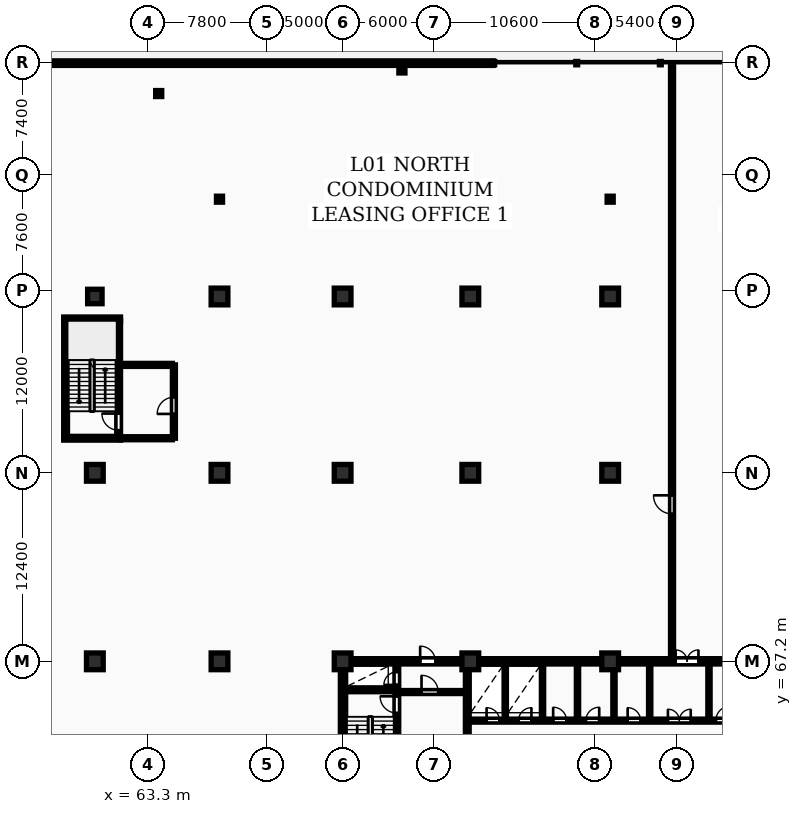
"""IFC4 building model, lengths in metres.
Left out: names, types, materials, properties, quantities, classifications, styles, units other than length and angle.
Written with IfcOpenShell. Run it as: python <this file> out.ifc"""

import sys

from ifc_helpers import new_model, si_unit, direction, frame, frame_2d, origin, origin_2d, place, context, subcontext, project, spatial, rectangle, circle, i_section, extrude, element, fill, save


model = new_model("IFC4")
c1 = context("Model", 3, precision=1e-05, world=origin(), true_north=direction((0.0, 1.0)))
c2 = subcontext(c1, "Body", "Model", "MODEL_VIEW")
j1 = project(units=[si_unit("LENGTHUNIT", "METRE"), si_unit("PLANEANGLEUNIT", "RADIAN")], contexts=[c1])
p1 = place(None, origin())
s1 = spatial("IfcSite", under=j1, at=p1, CompositionType="ELEMENT")
p2 = place(p1, origin())
s2 = spatial("IfcBuilding", under=s1, at=p2, CompositionType="ELEMENT")
p3 = place(p2, frame((0.0, 0.0, 5.4)))
s3 = spatial("IfcBuildingStorey", under=s2, at=p3, CompositionType="ELEMENT", Elevation=5.4)
for number, where, z_axis, x_axis in (
    (1, (59.8, 67.2, 0.0), (0.0, 0.0, 1.0), (1.0, 0.0, 0.0)),
    (2, (59.8, 79.6, 0.0), (0.0, 0.0, 1.0), (1.0, 0.0, 0.0)),
):
    element("IfcColumn", number, at=place(p3, frame(where, z_axis=z_axis, x_axis=x_axis)), inside=s3, PredefinedType="COLUMN", context=c2, shape_type="SweptSolid", body=[
        extrude(rectangle(XDim=1.1, YDim=1.1, at=origin_2d()), origin(), (0.0, 0.0, 1.0), 4.6),
    ])
p4 = place(p3, frame((59.8, 91.2, 0.0), z_axis=(0.0, 0.0, 1.0), x_axis=(1.0, 0.0, 0.0)))
e3 = element("IfcColumn", 3, at=p4, inside=s3, PredefinedType="COLUMN", context=c2, shape_type="SweptSolid", body=[
    extrude(circle(Radius=0.475, at=origin_2d()), origin(), (0.0, 0.0, 1.0), 4.6),
])
for number, where, z_axis, x_axis in (
    (4, (68.0, 67.2, 0.0), (0.0, 0.0, 1.0), (1.0, 0.0, 0.0)),
    (5, (68.0, 79.6, 0.0), (0.0, 0.0, 1.0), (1.0, 0.0, 0.0)),
    (6, (68.0, 91.2, 0.0), (0.0, 0.0, 1.0), (1.0, 0.0, 0.0)),
    (7, (76.1, 67.2, 0.0), (0.0, 0.0, 1.0), (1.0, 0.0, 0.0)),
    (8, (76.1, 79.6, 0.0), (0.0, 0.0, 1.0), (1.0, 0.0, 0.0)),
    (9, (76.1, 91.2, 0.0), (0.0, 0.0, 1.0), (1.0, 0.0, 0.0)),
    (10, (84.5, 67.2, 0.0), (0.0, 0.0, 1.0), (1.0, 0.0, 0.0)),
    (11, (84.5, 79.6, 0.0), (0.0, 0.0, 1.0), (1.0, 0.0, 0.0)),
    (12, (84.5, 91.2, 0.0), (0.0, 0.0, 1.0), (1.0, 0.0, 0.0)),
    (13, (93.7, 67.2, 0.0), (0.0, 0.0, 1.0), (1.0, 0.0, 0.0)),
    (14, (93.7, 79.6, 0.0), (0.0, 0.0, 1.0), (1.0, 0.0, 0.0)),
    (15, (93.7, 91.2, 0.0), (0.0, 0.0, 1.0), (1.0, 0.0, 0.0)),
):
    element("IfcColumn", number, at=place(p3, frame(where, z_axis=z_axis, x_axis=x_axis)), inside=s3, PredefinedType="COLUMN", context=c2, shape_type="SweptSolid", body=[
        extrude(rectangle(XDim=1.1, YDim=1.1, at=origin_2d()), origin(), (0.0, 0.0, 1.0), 4.6),
    ])
for number, where, z_axis, x_axis in (
    (16, (68.0, 97.6, 0.0), (0.0, 0.0, 1.0), (1.0, 0.0, 0.0)),
    (17, (93.7, 97.6, 0.0), (0.0, 0.0, 1.0), (1.0, 0.0, 0.0)),
):
    element("IfcColumn", number, at=place(p3, frame(where, z_axis=z_axis, x_axis=x_axis)), inside=s3, PredefinedType="COLUMN", context=c2, shape_type="SweptSolid", body=[
        extrude(i_section(OverallWidth=0.399, OverallDepth=0.394, WebThickness=0.023, FlangeThickness=0.037, FilletRadius=0.015, at=origin_2d()), origin(), (0.0, 0.0, 1.0), 4.6),
    ])
for number, where, z_axis, x_axis in (
    (18, (80.0, 106.1, 0.0), (0.0, 0.0, 1.0), (1.0, 0.0, 0.0)),
    (19, (64.0, 104.55, 0.0), (0.0, 0.0, 1.0), (1.0, 0.0, 0.0)),
):
    element("IfcColumn", number, at=place(p3, frame(where, z_axis=z_axis, x_axis=x_axis)), inside=s3, PredefinedType="COLUMN", context=c2, shape_type="SweptSolid", body=[
        extrude(i_section(OverallWidth=0.399, OverallDepth=0.394, WebThickness=0.023, FlangeThickness=0.037, FilletRadius=0.015, at=origin_2d()), origin(), (0.0, 0.0, 1.0), 4.36),
    ])
p5 = place(p3, frame((86.0, 106.55, 0.0), z_axis=(0.0, 0.0, 1.0), x_axis=(-1.0, 0.0, 0.0)))
e20 = element("IfcWall", 20, at=p5, inside=s3, PredefinedType="STANDARD", context=c2, shape_type="SweptSolid", body=[
    extrude(rectangle(XDim=39.5, YDim=0.3, at=frame_2d((19.75, 0.0))), origin(), (0.0, 0.0, 1.0), 4.3),
])
p6 = place(p3, frame((76.125, 55.375, 0.0), z_axis=(0.0, 0.0, 1.0), x_axis=(0.0, 1.0, 0.0)))
e21 = element("IfcWall", 21, at=p6, inside=s3, PredefinedType="SHEAR", context=c2, shape_type="SweptSolid", body=[
    extrude(rectangle(XDim=11.65, YDim=0.35, at=frame_2d((5.825, 0.0))), origin(), (0.0, 0.0, 1.0), 4.6),
])
p7 = place(p3, frame((75.95, 67.2, 0.0), z_axis=(0.0, 0.0, 1.0), x_axis=(1.0, 0.0, 0.0)))
e22 = element("IfcWall", 22, at=p7, inside=s3, PredefinedType="SHEAR", context=c2, shape_type="SweptSolid", body=[
    extrude(rectangle(XDim=36.3, YDim=0.35, at=frame_2d((18.15, 0.0))), origin(), (0.0, 0.0, 1.0), 4.6),
])
p8 = place(p7, frame((5.25, 0.0, 0.0)))
e23 = element("IfcOpeningElement", 23, at=p8, cuts=e22, PredefinedType="OPENING", context=c2, shape_type="SweptSolid", body=[
    extrude(rectangle(XDim=1.0, YDim=2.15, at=frame_2d((0.5, 1.075))), frame((0.0, 0.185, 0.0), z_axis=(0.0, -1.0, 0.0), x_axis=(1.0, 0.0, 0.0)), (0.0, 0.0, 1.0), 0.37),
])
p9 = place(p7, frame((22.058, 0.0, 0.0)))
e24 = element("IfcOpeningElement", 24, at=p9, cuts=e22, PredefinedType="OPENING", context=c2, shape_type="SweptSolid", body=[
    extrude(rectangle(XDim=1.5, YDim=2.2, at=frame_2d((0.75, 1.1))), frame((0.0, 0.185, 0.0), z_axis=(0.0, -1.0, 0.0), x_axis=(1.0, 0.0, 0.0)), (0.0, 0.0, 1.0), 0.37),
])
p10 = place(p7, frame((30.45, 0.0, 0.0)))
e25 = element("IfcOpeningElement", 25, at=p10, cuts=e22, PredefinedType="OPENING", context=c2, shape_type="SweptSolid", body=[
    extrude(rectangle(XDim=1.0, YDim=2.15, at=frame_2d((0.5, 1.075))), frame((0.0, 0.185, 0.0), z_axis=(0.0, -1.0, 0.0), x_axis=(1.0, 0.0, 0.0)), (0.0, 0.0, 1.0), 0.37),
])
p11 = place(p3, frame((79.665, 55.4, 0.0), z_axis=(0.0, 0.0, 1.0), x_axis=(0.0, 1.0, 0.0)))
e26 = element("IfcWall", 26, at=p11, inside=s3, PredefinedType="SHEAR", context=c2, shape_type="SweptSolid", body=[
    extrude(rectangle(XDim=11.6, YDim=0.25, at=frame_2d((5.8, 0.0))), origin(), (0.0, 0.0, 1.0), 4.6),
])
p12 = place(p11, frame((0.55, 0.0, 0.0)))
e27 = element("IfcOpeningElement", 27, at=p12, cuts=e26, PredefinedType="OPENING", context=c2, shape_type="SweptSolid", body=[
    extrude(rectangle(XDim=0.85, YDim=2.05, at=frame_2d((0.425, 1.025))), frame((0.0, 0.135, 0.0), z_axis=(0.0, -1.0, 0.0), x_axis=(1.0, 0.0, 0.0)), (0.0, 0.0, 1.0), 0.27),
])
p13 = place(p11, frame((8.4, 0.0, 0.0)))
e28 = element("IfcOpeningElement", 28, at=p13, cuts=e26, PredefinedType="OPENING", context=c2, shape_type="SweptSolid", body=[
    extrude(rectangle(XDim=1.1, YDim=2.1, at=frame_2d((0.55, 1.05))), frame((0.0, 0.135, 0.0), z_axis=(0.0, -1.0, 0.0), x_axis=(1.0, 0.0, 0.0)), (0.0, 0.0, 1.0), 0.27),
])
p14 = place(p11, frame((10.25, 0.0, 0.0)))
e29 = element("IfcOpeningElement", 29, at=p14, cuts=e26, PredefinedType="OPENING", context=c2, shape_type="SweptSolid", body=[
    extrude(rectangle(XDim=0.85, YDim=2.05, at=frame_2d((0.425, 1.025))), frame((0.0, 0.135, 0.0), z_axis=(0.0, -1.0, 0.0), x_axis=(1.0, 0.0, 0.0)), (0.0, 0.0, 1.0), 0.27),
])
p15 = place(p3, frame((76.3, 65.325, 0.0), z_axis=(0.0, 0.0, 1.0), x_axis=(1.0, 0.0, 0.0)))
e30 = element("IfcWall", 30, at=p15, inside=s3, PredefinedType="SHEAR", context=c2, shape_type="SweptSolid", body=[
    extrude(rectangle(XDim=3.24, YDim=0.25, at=frame_2d((1.62, 0.0))), origin(), (0.0, 0.0, 1.0), 4.6),
])
p16 = place(p3, frame((79.79, 65.18, 0.0), z_axis=(0.0, 0.0, 1.0), x_axis=(1.0, 0.0, 0.0)))
e31 = element("IfcWall", 31, at=p16, inside=s3, PredefinedType="PARTITIONING", context=c2, shape_type="SweptSolid", body=[
    extrude(rectangle(XDim=4.39, YDim=0.2, at=frame_2d((2.195, 0.0))), origin(), (0.0, 0.0, 1.0), 4.3),
])
p17 = place(p16, frame((1.5, 0.0, 0.0)))
e32 = element("IfcOpeningElement", 32, at=p17, cuts=e31, PredefinedType="OPENING", context=c2, shape_type="SweptSolid", body=[
    extrude(rectangle(XDim=1.1, YDim=2.1, at=frame_2d((0.55, 1.05))), frame((0.0, 0.11, 0.0), z_axis=(0.0, -1.0, 0.0), x_axis=(1.0, 0.0, 0.0)), (0.0, 0.0, 1.0), 0.22),
])
p18 = place(p3, frame((84.3, 55.4, 0.0), z_axis=(0.0, 0.0, 1.0), x_axis=(0.0, 1.0, 0.0)))
e33 = element("IfcWall", 33, at=p18, inside=s3, PredefinedType="SHEAR", context=c2, shape_type="SweptSolid", body=[
    extrude(rectangle(XDim=11.6, YDim=0.25, at=frame_2d((5.8, 0.0))), origin(), (0.0, 0.0, 1.0), 4.6),
])
p19 = place(p18, frame((5.2, 0.0, 0.0)))
e34 = element("IfcOpeningElement", 34, at=p19, cuts=e33, PredefinedType="OPENING", context=c2, shape_type="SweptSolid", body=[
    extrude(rectangle(XDim=1.1, YDim=2.1, at=frame_2d((0.55, 1.05))), frame((0.0, 0.135, 0.0), z_axis=(0.0, -1.0, 0.0), x_axis=(1.0, 0.0, 0.0)), (0.0, 0.0, 1.0), 0.27),
])
for number, where, z_axis, x_axis in (
    (35, (86.8, 63.4, 0.0), (0.0, 0.0, 1.0), (0.0, 1.0, 0.0)),
    (36, (89.25, 63.4, 0.0), (0.0, 0.0, 1.0), (0.0, 1.0, 0.0)),
    (37, (91.55, 63.4, 0.0), (0.0, 0.0, 1.0), (0.0, 1.0, 0.0)),
):
    element("IfcWall", number, at=place(p3, frame(where, z_axis=z_axis, x_axis=x_axis)), inside=s3, PredefinedType="PARTITIONING", context=c2, shape_type="SweptSolid", body=[
        extrude(rectangle(XDim=3.6, YDim=0.15, at=frame_2d((1.8, 0.0))), origin(), (0.0, 0.0, 1.0), 4.3),
    ])
p20 = place(p3, frame((93.95, 63.4, 0.0), z_axis=(0.0, 0.0, 1.0), x_axis=(0.0, 1.0, 0.0)))
e38 = element("IfcWall", 38, at=p20, inside=s3, PredefinedType="PARTITIONING", context=c2, shape_type="SweptSolid", body=[
    extrude(rectangle(XDim=3.6, YDim=0.15, at=frame_2d((1.8, 0.0))), origin(), (0.0, 0.0, 1.0), 3.55),
])
for number, where, z_axis, x_axis in (
    (39, (96.3, 63.4, 0.0), (0.0, 0.0, 1.0), (0.0, 1.0, 0.0)),
    (40, (100.2, 63.4, 0.0), (0.0, 0.0, 1.0), (0.0, 1.0, 0.0)),
):
    element("IfcWall", number, at=place(p3, frame(where, z_axis=z_axis, x_axis=x_axis)), inside=s3, PredefinedType="PARTITIONING", context=c2, shape_type="SweptSolid", body=[
        extrude(rectangle(XDim=3.6, YDim=0.15, at=frame_2d((1.8, 0.0))), origin(), (0.0, 0.0, 1.0), 4.3),
    ])
p21 = place(p3, frame((84.42, 63.3, 0.0), z_axis=(0.0, 0.0, 1.0), x_axis=(1.0, 0.0, 0.0)))
e41 = element("IfcWall", 41, at=p21, inside=s3, PredefinedType="PARTITIONING", context=c2, shape_type="SweptSolid", body=[
    extrude(rectangle(XDim=19.83, YDim=0.2, at=frame_2d((9.915, 0.0))), origin(), (0.0, 0.0, 1.0), 4.3),
])
p22 = place(p21, frame((1.15, 0.0, 0.0)))
e42 = element("IfcOpeningElement", 42, at=p22, cuts=e41, PredefinedType="OPENING", context=c2, shape_type="SweptSolid", body=[
    extrude(rectangle(XDim=0.85, YDim=2.05, at=frame_2d((0.425, 1.025))), frame((0.0, 0.11, 0.0), z_axis=(0.0, -1.0, 0.0), x_axis=(1.0, 0.0, 0.0)), (0.0, 0.0, 1.0), 0.22),
])
p23 = place(p21, frame((3.25, 0.0, 0.0)))
e43 = element("IfcOpeningElement", 43, at=p23, cuts=e41, PredefinedType="OPENING", context=c2, shape_type="SweptSolid", body=[
    extrude(rectangle(XDim=0.85, YDim=2.05, at=frame_2d((0.425, 1.025))), frame((0.0, 0.11, 0.0), z_axis=(0.0, -1.0, 0.0), x_axis=(1.0, 0.0, 0.0)), (0.0, 0.0, 1.0), 0.22),
])
p24 = place(p21, frame((13.08, 0.0, 0.0)))
e44 = element("IfcOpeningElement", 44, at=p24, cuts=e41, PredefinedType="OPENING", context=c2, shape_type="SweptSolid", body=[
    extrude(rectangle(XDim=1.5, YDim=2.2, at=frame_2d((0.75, 1.1))), frame((0.0, 0.11, 0.0), z_axis=(0.0, -1.0, 0.0), x_axis=(1.0, 0.0, 0.0)), (0.0, 0.0, 1.0), 0.22),
])
p25 = place(p21, frame((5.53, 0.0, 0.0)))
e45 = element("IfcOpeningElement", 45, at=p25, cuts=e41, PredefinedType="OPENING", context=c2, shape_type="SweptSolid", body=[
    extrude(rectangle(XDim=0.88, YDim=2.06, at=frame_2d((0.44, 1.03))), frame((0.0, 0.11, 0.0), z_axis=(0.0, -1.0, 0.0), x_axis=(1.0, 0.0, 0.0)), (0.0, 0.0, 1.0), 0.22),
])
p26 = place(p21, frame((7.68, 0.0, 0.0)))
e46 = element("IfcOpeningElement", 46, at=p26, cuts=e41, PredefinedType="OPENING", context=c2, shape_type="SweptSolid", body=[
    extrude(rectangle(XDim=0.88, YDim=2.06, at=frame_2d((0.44, 1.03))), frame((0.0, 0.11, 0.0), z_axis=(0.0, -1.0, 0.0), x_axis=(1.0, 0.0, 0.0)), (0.0, 0.0, 1.0), 0.22),
])
p27 = place(p21, frame((10.43, 0.0, 0.0)))
e47 = element("IfcOpeningElement", 47, at=p27, cuts=e41, PredefinedType="OPENING", context=c2, shape_type="SweptSolid", body=[
    extrude(rectangle(XDim=0.85, YDim=2.05, at=frame_2d((0.425, 1.025))), frame((0.0, 0.11, 0.0), z_axis=(0.0, -1.0, 0.0), x_axis=(1.0, 0.0, 0.0)), (0.0, 0.0, 1.0), 0.22),
])
p28 = place(p21, frame((16.23, 0.0, 0.0)))
e48 = element("IfcOpeningElement", 48, at=p28, cuts=e41, PredefinedType="OPENING", context=c2, shape_type="SweptSolid", body=[
    extrude(rectangle(XDim=0.96, YDim=2.1, at=frame_2d((0.48, 1.05))), frame((0.0, 0.11, 0.0), z_axis=(0.0, -1.0, 0.0), x_axis=(1.0, 0.0, 0.0)), (0.0, 0.0, 1.0), 0.22),
])
p29 = place(p21, frame((18.68, 0.0, 0.0)))
e49 = element("IfcOpeningElement", 49, at=p29, cuts=e41, PredefinedType="OPENING", context=c2, shape_type="SweptSolid", body=[
    extrude(rectangle(XDim=0.84, YDim=2.04, at=frame_2d((0.42, 1.02))), frame((0.0, 0.11, 0.0), z_axis=(0.0, -1.0, 0.0), x_axis=(1.0, 0.0, 0.0)), (0.0, 0.0, 1.0), 0.22),
])
p30 = place(p3, frame((57.875, 82.0, 0.0), z_axis=(0.0, 0.0, 1.0), x_axis=(0.0, 1.0, 0.0)))
e50 = element("IfcWall", 50, at=p30, inside=s3, PredefinedType="SHEAR", context=c2, shape_type="SweptSolid", body=[
    extrude(rectangle(XDim=7.6, YDim=0.25, at=frame_2d((3.8, 0.0))), origin(), (0.0, 0.0, 1.0), 4.6),
])
for number, where, z_axis, x_axis in (
    (51, (57.75, 81.875, 0.0), (0.0, 0.0, 1.0), (1.0, 0.0, 0.0)),
    (52, (57.75, 89.725, 0.0), (0.0, 0.0, 1.0), (1.0, 0.0, 0.0)),
):
    element("IfcWall", number, at=place(p3, frame(where, z_axis=z_axis, x_axis=x_axis)), inside=s3, PredefinedType="SHEAR", context=c2, shape_type="SweptSolid", body=[
        extrude(rectangle(XDim=3.74, YDim=0.25, at=frame_2d((1.87, 0.0))), origin(), (0.0, 0.0, 1.0), 4.6),
    ])
p31 = place(p3, frame((61.365, 82.0, 0.0), z_axis=(0.0, 0.0, 1.0), x_axis=(0.0, 1.0, 0.0)))
e53 = element("IfcWall", 53, at=p31, inside=s3, PredefinedType="SHEAR", context=c2, shape_type="SweptSolid", body=[
    extrude(rectangle(XDim=7.6, YDim=0.25, at=frame_2d((3.8, 0.0))), origin(), (0.0, 0.0, 1.0), 4.6),
])
p32 = place(p31, frame((0.4, 0.0, 0.0)))
e54 = element("IfcOpeningElement", 54, at=p32, cuts=e53, PredefinedType="OPENING", context=c2, shape_type="SweptSolid", body=[
    extrude(rectangle(XDim=1.1, YDim=2.1, at=frame_2d((0.55, 1.05))), frame((0.0, 0.135, 0.0), z_axis=(0.0, -1.0, 0.0), x_axis=(1.0, 0.0, 0.0)), (0.0, 0.0, 1.0), 0.27),
])
p33 = place(p3, frame((65.0, 81.875, 0.0), z_axis=(0.0, 0.0, 1.0), x_axis=(0.0, 1.0, 0.0)))
e55 = element("IfcWall", 55, at=p33, inside=s3, PredefinedType="PARTITIONING", context=c2, shape_type="SweptSolid", body=[
    extrude(rectangle(XDim=4.825, YDim=0.2, at=frame_2d((2.413, 0.0))), origin(), (0.0, 0.0, 1.0), 4.3),
])
p34 = place(p33, frame((1.6, 0.0, 0.0)))
e56 = element("IfcOpeningElement", 56, at=p34, cuts=e55, PredefinedType="OPENING", context=c2, shape_type="SweptSolid", body=[
    extrude(rectangle(XDim=1.1, YDim=2.15, at=frame_2d((0.55, 1.075))), frame((0.0, 0.11, 0.0), z_axis=(0.0, -1.0, 0.0), x_axis=(1.0, 0.0, 0.0)), (0.0, 0.0, 1.0), 0.22),
])
for number, where, z_axis, x_axis in (
    (57, (61.5, 81.875, 0.0), (0.0, 0.0, 1.0), (1.0, 0.0, 0.0)),
    (58, (61.5, 86.7, 0.0), (0.0, 0.0, 1.0), (1.0, 0.0, 0.0)),
):
    element("IfcWall", number, at=place(p3, frame(where, z_axis=z_axis, x_axis=x_axis)), inside=s3, PredefinedType="PARTITIONING", context=c2, shape_type="SweptSolid", body=[
        extrude(rectangle(XDim=3.4, YDim=0.2, at=frame_2d((1.7, 0.0))), origin(), (0.0, 0.0, 1.0), 4.3),
    ])
p35 = place(p3, frame((97.77, 67.4, 0.0), z_axis=(0.0, 0.0, 1.0), x_axis=(0.0, 1.0, 0.0)))
e59 = element("IfcWall", 59, at=p35, inside=s3, PredefinedType="PARTITIONING", context=c2, shape_type="SweptSolid", body=[
    extrude(rectangle(XDim=39.12, YDim=0.2, at=frame_2d((19.56, 0.0))), origin(), (0.0, 0.0, 1.0), 4.3),
])
p36 = place(p35, frame((9.5, 0.0, 0.0)))
e60 = element("IfcOpeningElement", 60, at=p36, cuts=e59, PredefinedType="OPENING", context=c2, shape_type="SweptSolid", body=[
    extrude(rectangle(XDim=1.22, YDim=2.18, at=frame_2d((0.61, 1.09))), frame((0.0, 0.11, 0.0), z_axis=(0.0, -1.0, 0.0), x_axis=(1.0, 0.0, 0.0)), (0.0, 0.0, 1.0), 0.22),
])
p37 = place(p8, origin())
e61 = element("IfcDoor", 61, at=p37, inside=s3, OperationType="SINGLE_SWING_LEFT", PredefinedType="DOOR", context=c2, shape_type="SweptSolid", body=[
    extrude(rectangle(XDim=1.0, YDim=2.15, at=frame_2d((0.5, 1.075))), frame((0.0, 0.025, 0.0), z_axis=(0.0, -1.0, 0.0), x_axis=(1.0, 0.0, 0.0)), (0.0, 0.0, 1.0), 0.05),
])
fill(e23, e61)
p38 = place(p9, origin())
e62 = element("IfcDoor", 62, at=p38, inside=s3, OperationType="DOUBLE_DOOR_SINGLE_SWING", PredefinedType="DOOR", context=c2, shape_type="SweptSolid", body=[
    extrude(rectangle(XDim=1.5, YDim=2.2, at=frame_2d((0.75, 1.1))), frame((0.0, 0.025, 0.0), z_axis=(0.0, -1.0, 0.0), x_axis=(1.0, 0.0, 0.0)), (0.0, 0.0, 1.0), 0.05),
])
fill(e24, e62)
p39 = place(p13, origin())
e63 = element("IfcDoor", 63, at=p39, inside=s3, OperationType="SINGLE_SWING_RIGHT", PredefinedType="DOOR", context=c2, shape_type="SweptSolid", body=[
    extrude(rectangle(XDim=1.1, YDim=2.1, at=frame_2d((0.55, 1.05))), frame((0.0, 0.025, 0.0), z_axis=(0.0, -1.0, 0.0), x_axis=(1.0, 0.0, 0.0)), (0.0, 0.0, 1.0), 0.05),
])
fill(e28, e63)
p40 = place(p14, origin())
e64 = element("IfcDoor", 64, at=p40, inside=s3, OperationType="SINGLE_SWING_LEFT", PredefinedType="DOOR", context=c2, shape_type="SweptSolid", body=[
    extrude(rectangle(XDim=0.85, YDim=2.05, at=frame_2d((0.425, 1.025))), frame((0.0, 0.025, 0.0), z_axis=(0.0, -1.0, 0.0), x_axis=(1.0, 0.0, 0.0)), (0.0, 0.0, 1.0), 0.05),
])
fill(e29, e64)
p41 = place(p17, origin())
e65 = element("IfcDoor", 65, at=p41, inside=s3, OperationType="SINGLE_SWING_LEFT", PredefinedType="DOOR", context=c2, shape_type="SweptSolid", body=[
    extrude(rectangle(XDim=1.1, YDim=2.1, at=frame_2d((0.55, 1.05))), frame((0.0, 0.025, 0.0), z_axis=(0.0, -1.0, 0.0), x_axis=(1.0, 0.0, 0.0)), (0.0, 0.0, 1.0), 0.05),
])
fill(e32, e65)
p42 = place(p22, origin())
e66 = element("IfcDoor", 66, at=p42, inside=s3, OperationType="SINGLE_SWING_LEFT", PredefinedType="DOOR", context=c2, shape_type="SweptSolid", body=[
    extrude(rectangle(XDim=0.85, YDim=2.05, at=frame_2d((0.425, 1.025))), frame((0.0, 0.025, 0.0), z_axis=(0.0, -1.0, 0.0), x_axis=(1.0, 0.0, 0.0)), (0.0, 0.0, 1.0), 0.05),
])
fill(e42, e66)
p43 = place(p23, origin())
e67 = element("IfcDoor", 67, at=p43, inside=s3, OperationType="SINGLE_SWING_RIGHT", PredefinedType="DOOR", context=c2, shape_type="SweptSolid", body=[
    extrude(rectangle(XDim=0.85, YDim=2.05, at=frame_2d((0.425, 1.025))), frame((0.0, 0.025, 0.0), z_axis=(0.0, -1.0, 0.0), x_axis=(1.0, 0.0, 0.0)), (0.0, 0.0, 1.0), 0.05),
])
fill(e43, e67)
p44 = place(p24, origin())
e68 = element("IfcDoor", 68, at=p44, inside=s3, OperationType="DOUBLE_DOOR_SINGLE_SWING", PredefinedType="DOOR", context=c2, shape_type="SweptSolid", body=[
    extrude(rectangle(XDim=1.5, YDim=2.2, at=frame_2d((0.75, 1.1))), frame((0.0, 0.025, 0.0), z_axis=(0.0, -1.0, 0.0), x_axis=(1.0, 0.0, 0.0)), (0.0, 0.0, 1.0), 0.05),
])
fill(e44, e68)
p45 = place(p25, origin())
e69 = element("IfcDoor", 69, at=p45, inside=s3, OperationType="SINGLE_SWING_LEFT", PredefinedType="DOOR", context=c2, shape_type="SweptSolid", body=[
    extrude(rectangle(XDim=0.88, YDim=2.06, at=frame_2d((0.44, 1.03))), frame((0.0, 0.025, 0.0), z_axis=(0.0, -1.0, 0.0), x_axis=(1.0, 0.0, 0.0)), (0.0, 0.0, 1.0), 0.05),
])
fill(e45, e69)
p46 = place(p26, origin())
e70 = element("IfcDoor", 70, at=p46, inside=s3, OperationType="SINGLE_SWING_RIGHT", PredefinedType="DOOR", context=c2, shape_type="SweptSolid", body=[
    extrude(rectangle(XDim=0.88, YDim=2.06, at=frame_2d((0.44, 1.03))), frame((0.0, 0.025, 0.0), z_axis=(0.0, -1.0, 0.0), x_axis=(1.0, 0.0, 0.0)), (0.0, 0.0, 1.0), 0.05),
])
fill(e46, e70)
p47 = place(p27, origin())
e71 = element("IfcDoor", 71, at=p47, inside=s3, OperationType="SINGLE_SWING_LEFT", PredefinedType="DOOR", context=c2, shape_type="SweptSolid", body=[
    extrude(rectangle(XDim=0.85, YDim=2.05, at=frame_2d((0.425, 1.025))), frame((0.0, 0.025, 0.0), z_axis=(0.0, -1.0, 0.0), x_axis=(1.0, 0.0, 0.0)), (0.0, 0.0, 1.0), 0.05),
])
fill(e47, e71)
p48 = place(p28, origin())
e72 = element("IfcDoor", 72, at=p48, inside=s3, OperationType="SINGLE_SWING_RIGHT", PredefinedType="DOOR", context=c2, shape_type="SweptSolid", body=[
    extrude(rectangle(XDim=0.96, YDim=2.1, at=frame_2d((0.48, 1.05))), frame((0.0, 0.025, 0.0), z_axis=(0.0, -1.0, 0.0), x_axis=(1.0, 0.0, 0.0)), (0.0, 0.0, 1.0), 0.05),
])
fill(e48, e72)
p49 = place(p32, origin())
e73 = element("IfcDoor", 73, at=p49, inside=s3, OperationType="SINGLE_SWING_RIGHT", PredefinedType="DOOR", context=c2, shape_type="SweptSolid", body=[
    extrude(rectangle(XDim=1.1, YDim=2.1, at=frame_2d((0.55, 1.05))), frame((0.0, 0.025, 0.0), z_axis=(0.0, -1.0, 0.0), x_axis=(1.0, 0.0, 0.0)), (0.0, 0.0, 1.0), 0.05),
])
fill(e54, e73)
p50 = place(p34, origin())
e74 = element("IfcDoor", 74, at=p50, inside=s3, OperationType="SINGLE_SWING_LEFT", PredefinedType="DOOR", context=c2, shape_type="SweptSolid", body=[
    extrude(rectangle(XDim=1.1, YDim=2.15, at=frame_2d((0.55, 1.075))), frame((0.0, 0.025, 0.0), z_axis=(0.0, -1.0, 0.0), x_axis=(1.0, 0.0, 0.0)), (0.0, 0.0, 1.0), 0.05),
])
fill(e56, e74)
p51 = place(p36, origin())
e75 = element("IfcDoor", 75, at=p51, inside=s3, OperationType="SINGLE_SWING_RIGHT", PredefinedType="DOOR", context=c2, shape_type="SweptSolid", body=[
    extrude(rectangle(XDim=1.22, YDim=2.18, at=frame_2d((0.61, 1.09))), frame((0.0, 0.025, 0.0), z_axis=(0.0, -1.0, 0.0), x_axis=(1.0, 0.0, 0.0)), (0.0, 0.0, 1.0), 0.05),
])
fill(e60, e75)
save(model, sys.argv[1])
